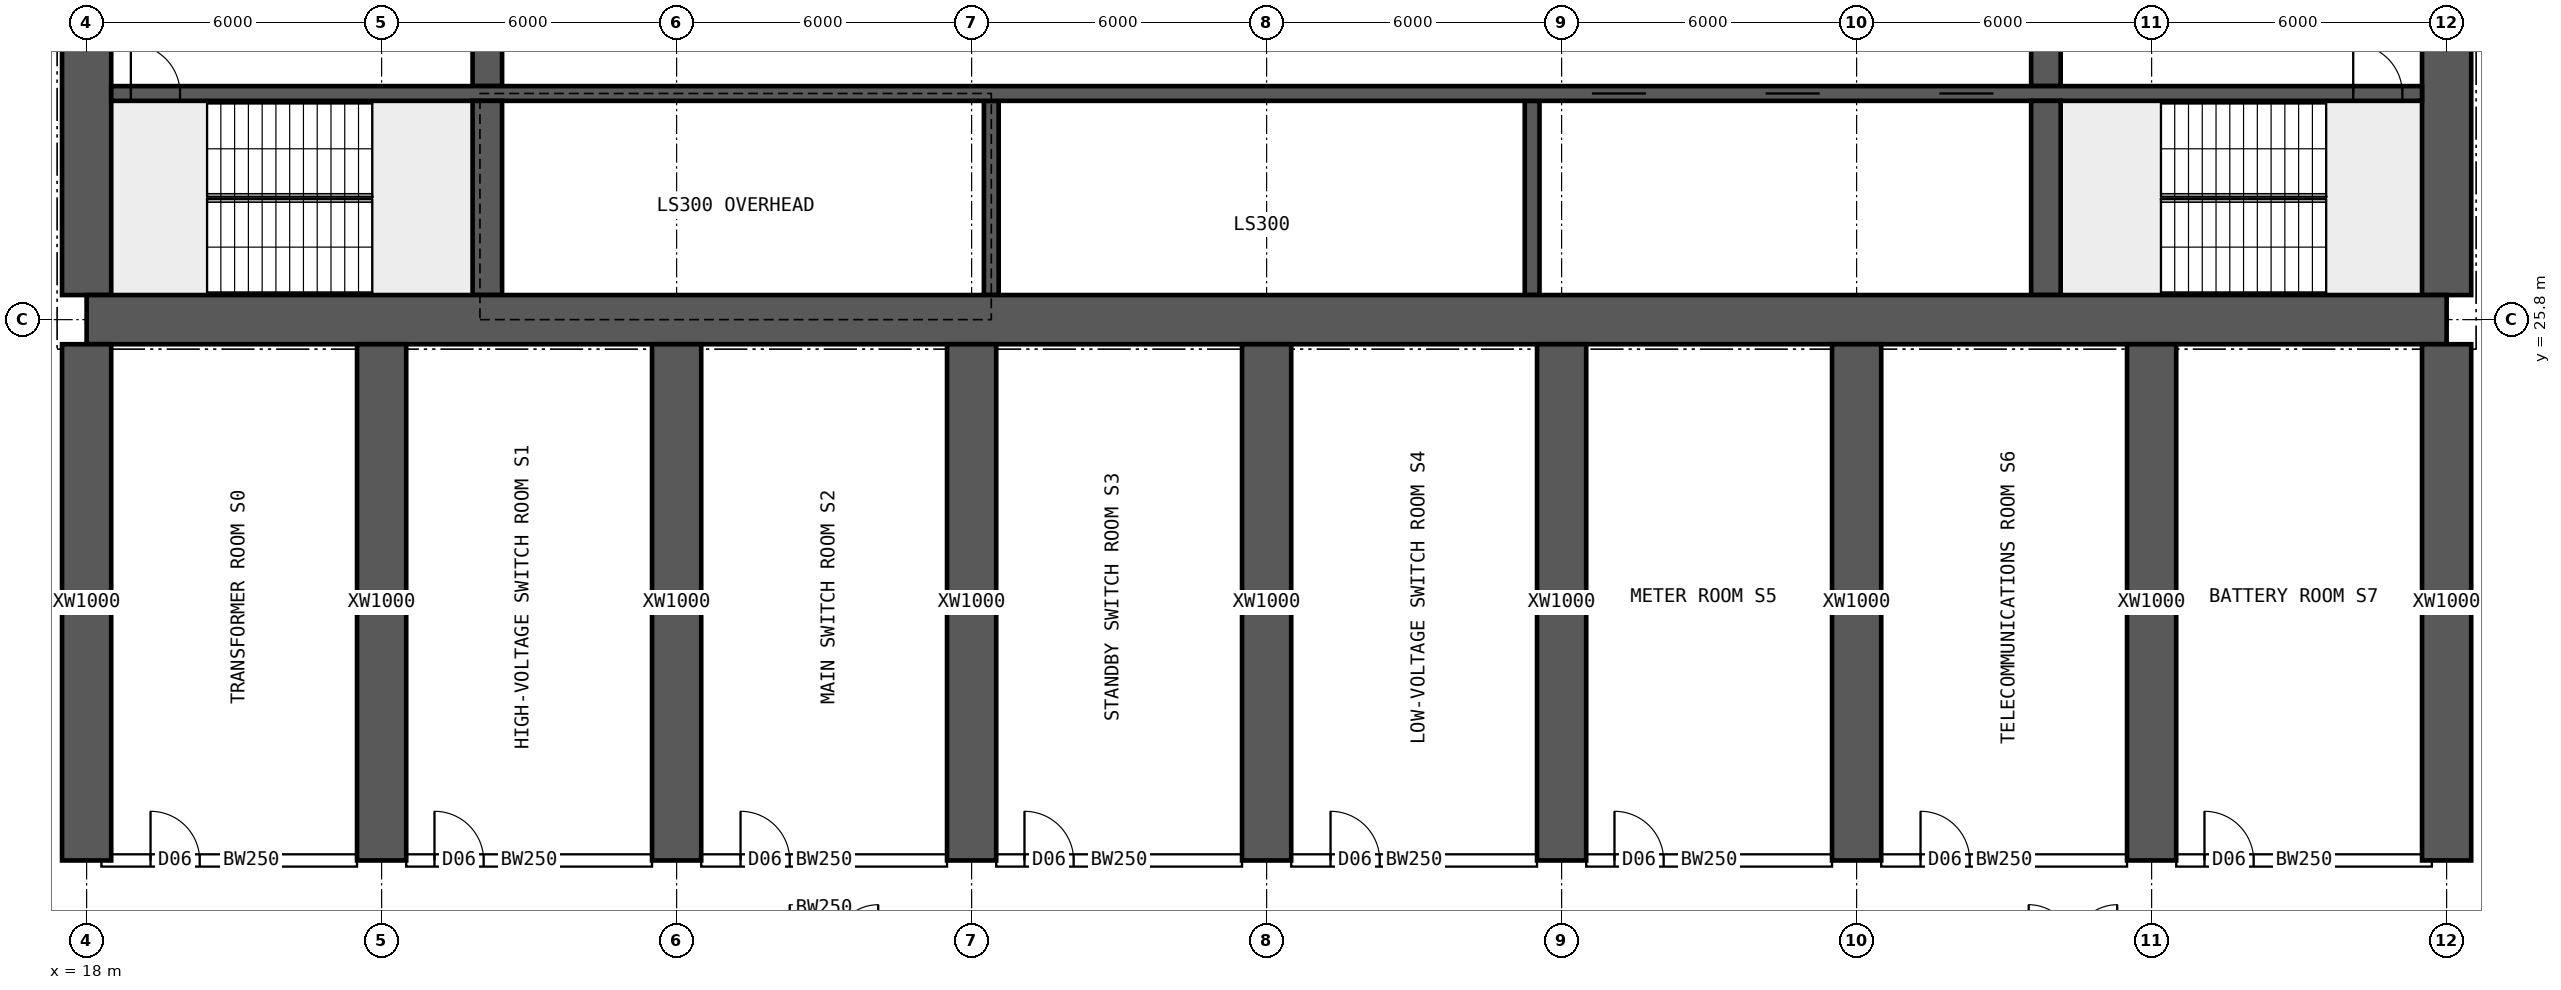
"""IFC4 building model, lengths in metres.
Left out: names, types, materials, properties, quantities, classifications, styles, units other than length and angle.
Written with IfcOpenShell. Run it as: python <this file> out.ifc"""

import sys

from ifc_helpers import new_model, si_unit, direction, frame, frame_2d, origin, place, context, subcontext, project, spatial, rectangle, extrude, element, fill, save


model = new_model("IFC4")
c1 = context("Model", 3, precision=1e-05, world=origin(), true_north=direction((0.0, 1.0)))
c2 = subcontext(c1, "Body", "Model", "MODEL_VIEW")
j1 = project(units=[si_unit("LENGTHUNIT", "METRE"), si_unit("PLANEANGLEUNIT", "RADIAN")], contexts=[c1])
p1 = place(None, origin())
s1 = spatial("IfcSite", under=j1, at=p1, CompositionType="ELEMENT")
p2 = place(p1, origin())
s2 = spatial("IfcBuilding", under=s1, at=p2, CompositionType="ELEMENT")
p3 = place(p2, frame((0.0, 0.0, -4.5)))
s3 = spatial("IfcBuildingStorey", under=s2, at=p3, CompositionType="ELEMENT", Elevation=-4.5)
p4 = place(p3, frame((18.0, 25.8, 0.0), z_axis=(0.0, 0.0, 1.0), x_axis=(1.0, 0.0, 0.0)))
e1 = element("IfcWall", 1, at=p4, inside=s3, PredefinedType="SHEAR", context=c2, shape_type="SweptSolid", body=[
    extrude(rectangle(XDim=48.0, YDim=1.0, at=frame_2d((24.0, 0.0))), origin(), (0.0, 0.0, 1.0), 4.5),
])
p5 = place(p3, frame((18.0, 26.3, 0.0), z_axis=(0.0, 0.0, 1.0), x_axis=(0.0, 1.0, 0.0)))
e2 = element("IfcWall", 2, at=p5, inside=s3, PredefinedType="SHEAR", context=c2, shape_type="SweptSolid", body=[
    extrude(rectangle(XDim=11.4, YDim=1.0, at=frame_2d((5.7, 0.0))), origin(), (0.0, 0.0, 1.0), 4.5),
])
p6 = place(p5, frame((5.0, 0.0, 0.0)))
e3 = element("IfcOpeningElement", 3, at=p6, cuts=e2, PredefinedType="OPENING", context=c2, shape_type="SweptSolid", body=[
    extrude(rectangle(XDim=1.2, YDim=2.1, at=frame_2d((0.6, 1.05))), frame((0.0, 0.51, 0.0), z_axis=(0.0, -1.0, 0.0), x_axis=(1.0, 0.0, 0.0)), (0.0, 0.0, 1.0), 1.02),
])
p7 = place(p3, frame((66.0, 26.3, 0.0), z_axis=(0.0, 0.0, 1.0), x_axis=(0.0, 1.0, 0.0)))
e4 = element("IfcWall", 4, at=p7, inside=s3, PredefinedType="SHEAR", context=c2, shape_type="SweptSolid", body=[
    extrude(rectangle(XDim=11.4, YDim=1.0, at=frame_2d((5.7, 0.0))), origin(), (0.0, 0.0, 1.0), 4.5),
])
p8 = place(p7, frame((5.0, 0.0, 0.0)))
e5 = element("IfcOpeningElement", 5, at=p8, cuts=e4, PredefinedType="OPENING", context=c2, shape_type="SweptSolid", body=[
    extrude(rectangle(XDim=1.2, YDim=2.1, at=frame_2d((0.6, 1.05))), frame((0.0, 0.51, 0.0), z_axis=(0.0, -1.0, 0.0), x_axis=(1.0, 0.0, 0.0)), (0.0, 0.0, 1.0), 1.02),
])
p9 = place(p3, frame((18.5, 30.4, 0.0), z_axis=(0.0, 0.0, 1.0), x_axis=(1.0, 0.0, 0.0)))
e6 = element("IfcWall", 6, at=p9, inside=s3, PredefinedType="SHEAR", context=c2, shape_type="SweptSolid", body=[
    extrude(rectangle(XDim=47.0, YDim=0.3, at=frame_2d((23.5, 0.0))), origin(), (0.0, 0.0, 1.0), 4.5),
])
p10 = place(p9, frame((0.4, 0.0, 0.0)))
e7 = element("IfcOpeningElement", 7, at=p10, cuts=e6, PredefinedType="OPENING", context=c2, shape_type="SweptSolid", body=[
    extrude(rectangle(XDim=1.0, YDim=2.1, at=frame_2d((0.5, 1.05))), frame((0.0, 0.16, 0.0), z_axis=(0.0, -1.0, 0.0), x_axis=(1.0, 0.0, 0.0)), (0.0, 0.0, 1.0), 0.32),
])
p11 = place(p9, frame((45.6, 0.0, 0.0)))
e8 = element("IfcOpeningElement", 8, at=p11, cuts=e6, PredefinedType="OPENING", context=c2, shape_type="SweptSolid", body=[
    extrude(rectangle(XDim=1.0, YDim=2.1, at=frame_2d((0.5, 1.05))), frame((0.0, 0.16, 0.0), z_axis=(0.0, -1.0, 0.0), x_axis=(1.0, 0.0, 0.0)), (0.0, 0.0, 1.0), 0.32),
])
p12 = place(p9, frame((30.117, 0.0, 0.0)))
e9 = element("IfcOpeningElement", 9, at=p12, cuts=e6, PredefinedType="OPENING", context=c2, shape_type="SweptSolid", body=[
    extrude(rectangle(XDim=1.1, YDim=2.1, at=frame_2d((0.55, 1.05))), frame((0.0, 0.16, 0.0), z_axis=(0.0, -1.0, 0.0), x_axis=(1.0, 0.0, 0.0)), (0.0, 0.0, 1.0), 0.32),
])
p13 = place(p9, frame((33.65, 0.0, 0.0)))
e10 = element("IfcOpeningElement", 10, at=p13, cuts=e6, PredefinedType="OPENING", context=c2, shape_type="SweptSolid", body=[
    extrude(rectangle(XDim=1.1, YDim=2.1, at=frame_2d((0.55, 1.05))), frame((0.0, 0.16, 0.0), z_axis=(0.0, -1.0, 0.0), x_axis=(1.0, 0.0, 0.0)), (0.0, 0.0, 1.0), 0.32),
])
p14 = place(p9, frame((37.183, 0.0, 0.0)))
e11 = element("IfcOpeningElement", 11, at=p14, cuts=e6, PredefinedType="OPENING", context=c2, shape_type="SweptSolid", body=[
    extrude(rectangle(XDim=1.1, YDim=2.1, at=frame_2d((0.55, 1.05))), frame((0.0, 0.16, 0.0), z_axis=(0.0, -1.0, 0.0), x_axis=(1.0, 0.0, 0.0)), (0.0, 0.0, 1.0), 0.32),
])
for number, where, z_axis, x_axis in (
    (12, (26.15, 26.3, 0.0), (0.0, 0.0, 1.0), (0.0, 1.0, 0.0)),
    (13, (57.85, 26.3, 0.0), (0.0, 0.0, 1.0), (0.0, 1.0, 0.0)),
):
    element("IfcWall", number, at=place(p3, frame(where, z_axis=z_axis, x_axis=x_axis)), inside=s3, PredefinedType="SHEAR", context=c2, shape_type="SweptSolid", body=[
        extrude(rectangle(XDim=3.95, YDim=0.6, at=frame_2d((1.975, 0.0))), origin(), (0.0, 0.0, 1.0), 4.5),
    ])
p15 = place(p3, frame((26.15, 30.55, 0.0), z_axis=(0.0, 0.0, 1.0), x_axis=(0.0, 1.0, 0.0)))
e14 = element("IfcWall", 14, at=p15, inside=s3, PredefinedType="SHEAR", context=c2, shape_type="SweptSolid", body=[
    extrude(rectangle(XDim=3.9, YDim=0.6, at=frame_2d((1.95, 0.0))), origin(), (0.0, 0.0, 1.0), 4.5),
])
p16 = place(p15, frame((1.4, 0.0, 0.0)))
e15 = element("IfcOpeningElement", 15, at=p16, cuts=e14, PredefinedType="OPENING", context=c2, shape_type="SweptSolid", body=[
    extrude(rectangle(XDim=1.2, YDim=2.1, at=frame_2d((0.6, 1.05))), frame((0.0, 0.31, 0.0), z_axis=(0.0, -1.0, 0.0), x_axis=(1.0, 0.0, 0.0)), (0.0, 0.0, 1.0), 0.62),
])
p17 = place(p3, frame((57.85, 30.55, 0.0), z_axis=(0.0, 0.0, 1.0), x_axis=(0.0, 1.0, 0.0)))
e16 = element("IfcWall", 16, at=p17, inside=s3, PredefinedType="SHEAR", context=c2, shape_type="SweptSolid", body=[
    extrude(rectangle(XDim=3.9, YDim=0.6, at=frame_2d((1.95, 0.0))), origin(), (0.0, 0.0, 1.0), 4.5),
])
p18 = place(p17, frame((1.4, 0.0, 0.0)))
e17 = element("IfcOpeningElement", 17, at=p18, cuts=e16, PredefinedType="OPENING", context=c2, shape_type="SweptSolid", body=[
    extrude(rectangle(XDim=1.2, YDim=2.1, at=frame_2d((0.6, 1.05))), frame((0.0, 0.31, 0.0), z_axis=(0.0, -1.0, 0.0), x_axis=(1.0, 0.0, 0.0)), (0.0, 0.0, 1.0), 0.62),
])
for number, where, z_axis, x_axis in (
    (18, (36.4, 26.3, 0.0), (0.0, 0.0, 1.0), (0.0, 1.0, 0.0)),
    (19, (47.4, 26.3, 0.0), (0.0, 0.0, 1.0), (0.0, 1.0, 0.0)),
):
    element("IfcWall", number, at=place(p3, frame(where, z_axis=z_axis, x_axis=x_axis)), inside=s3, PredefinedType="SHEAR", context=c2, shape_type="SweptSolid", body=[
        extrude(rectangle(XDim=3.95, YDim=0.3, at=frame_2d((1.975, 0.0))), origin(), (0.0, 0.0, 1.0), 4.5),
    ])
for number, where, z_axis, x_axis in (
    (20, (18.0, 14.8, 0.0), (0.0, 0.0, 1.0), (0.0, 1.0, 0.0)),
    (21, (24.0, 14.8, 0.0), (0.0, 0.0, 1.0), (0.0, 1.0, 0.0)),
    (22, (30.0, 14.8, 0.0), (0.0, 0.0, 1.0), (0.0, 1.0, 0.0)),
    (23, (36.0, 14.8, 0.0), (0.0, 0.0, 1.0), (0.0, 1.0, 0.0)),
    (24, (42.0, 14.8, 0.0), (0.0, 0.0, 1.0), (0.0, 1.0, 0.0)),
    (25, (48.0, 14.8, 0.0), (0.0, 0.0, 1.0), (0.0, 1.0, 0.0)),
    (26, (54.0, 14.8, 0.0), (0.0, 0.0, 1.0), (0.0, 1.0, 0.0)),
    (27, (60.0, 14.8, 0.0), (0.0, 0.0, 1.0), (0.0, 1.0, 0.0)),
    (28, (66.0, 14.8, 0.0), (0.0, 0.0, 1.0), (0.0, 1.0, 0.0)),
):
    element("IfcWall", number, at=place(p3, frame(where, z_axis=z_axis, x_axis=x_axis)), inside=s3, PredefinedType="SHEAR", context=c2, shape_type="SweptSolid", body=[
        extrude(rectangle(XDim=10.5, YDim=1.0, at=frame_2d((5.25, 0.0))), origin(), (0.0, 0.0, 1.0), 4.5),
    ])
p19 = place(p3, frame((18.3, 14.8, 0.0), z_axis=(0.0, 0.0, 1.0), x_axis=(1.0, 0.0, 0.0)))
e29 = element("IfcWall", 29, at=p19, inside=s3, PredefinedType="SOLIDWALL", context=c2, shape_type="SweptSolid", body=[
    extrude(rectangle(XDim=5.2, YDim=0.25, at=frame_2d((2.6, 0.0))), origin(), (0.0, 0.0, 1.0), 4.15),
])
p20 = place(p19, frame((1.0, 0.0, 0.0)))
e30 = element("IfcOpeningElement", 30, at=p20, cuts=e29, PredefinedType="OPENING", context=c2, shape_type="SweptSolid", body=[
    extrude(rectangle(XDim=1.0, YDim=2.1, at=frame_2d((0.5, 1.05))), frame((0.0, 0.135, 0.0), z_axis=(0.0, -1.0, 0.0), x_axis=(1.0, 0.0, 0.0)), (0.0, 0.0, 1.0), 0.27),
])
p21 = place(p3, frame((24.5, 14.8, 0.0), z_axis=(0.0, 0.0, 1.0), x_axis=(1.0, 0.0, 0.0)))
e31 = element("IfcWall", 31, at=p21, inside=s3, PredefinedType="SOLIDWALL", context=c2, shape_type="SweptSolid", body=[
    extrude(rectangle(XDim=5.0, YDim=0.25, at=frame_2d((2.5, 0.0))), origin(), (0.0, 0.0, 1.0), 4.15),
])
p22 = place(p21, frame((0.575, 0.0, 0.0)))
e32 = element("IfcOpeningElement", 32, at=p22, cuts=e31, PredefinedType="OPENING", context=c2, shape_type="SweptSolid", body=[
    extrude(rectangle(XDim=1.0, YDim=2.1, at=frame_2d((0.5, 1.05))), frame((0.0, 0.135, 0.0), z_axis=(0.0, -1.0, 0.0), x_axis=(1.0, 0.0, 0.0)), (0.0, 0.0, 1.0), 0.27),
])
p23 = place(p3, frame((30.5, 14.8, 0.0), z_axis=(0.0, 0.0, 1.0), x_axis=(1.0, 0.0, 0.0)))
e33 = element("IfcWall", 33, at=p23, inside=s3, PredefinedType="SOLIDWALL", context=c2, shape_type="SweptSolid", body=[
    extrude(rectangle(XDim=5.0, YDim=0.25, at=frame_2d((2.5, 0.0))), origin(), (0.0, 0.0, 1.0), 4.15),
])
p24 = place(p23, frame((0.8, 0.0, 0.0)))
e34 = element("IfcOpeningElement", 34, at=p24, cuts=e33, PredefinedType="OPENING", context=c2, shape_type="SweptSolid", body=[
    extrude(rectangle(XDim=1.0, YDim=2.1, at=frame_2d((0.5, 1.05))), frame((0.0, 0.135, 0.0), z_axis=(0.0, -1.0, 0.0), x_axis=(1.0, 0.0, 0.0)), (0.0, 0.0, 1.0), 0.27),
])
p25 = place(p3, frame((36.5, 14.8, 0.0), z_axis=(0.0, 0.0, 1.0), x_axis=(1.0, 0.0, 0.0)))
e35 = element("IfcWall", 35, at=p25, inside=s3, PredefinedType="SOLIDWALL", context=c2, shape_type="SweptSolid", body=[
    extrude(rectangle(XDim=5.0, YDim=0.25, at=frame_2d((2.5, 0.0))), origin(), (0.0, 0.0, 1.0), 4.15),
])
p26 = place(p25, frame((0.575, 0.0, 0.0)))
e36 = element("IfcOpeningElement", 36, at=p26, cuts=e35, PredefinedType="OPENING", context=c2, shape_type="SweptSolid", body=[
    extrude(rectangle(XDim=1.0, YDim=2.1, at=frame_2d((0.5, 1.05))), frame((0.0, 0.135, 0.0), z_axis=(0.0, -1.0, 0.0), x_axis=(1.0, 0.0, 0.0)), (0.0, 0.0, 1.0), 0.27),
])
p27 = place(p3, frame((42.5, 14.8, 0.0), z_axis=(0.0, 0.0, 1.0), x_axis=(1.0, 0.0, 0.0)))
e37 = element("IfcWall", 37, at=p27, inside=s3, PredefinedType="SOLIDWALL", context=c2, shape_type="SweptSolid", body=[
    extrude(rectangle(XDim=5.0, YDim=0.25, at=frame_2d((2.5, 0.0))), origin(), (0.0, 0.0, 1.0), 4.15),
])
p28 = place(p27, frame((0.8, 0.0, 0.0)))
e38 = element("IfcOpeningElement", 38, at=p28, cuts=e37, PredefinedType="OPENING", context=c2, shape_type="SweptSolid", body=[
    extrude(rectangle(XDim=1.0, YDim=2.1, at=frame_2d((0.5, 1.05))), frame((0.0, 0.135, 0.0), z_axis=(0.0, -1.0, 0.0), x_axis=(1.0, 0.0, 0.0)), (0.0, 0.0, 1.0), 0.27),
])
p29 = place(p3, frame((48.5, 14.8, 0.0), z_axis=(0.0, 0.0, 1.0), x_axis=(1.0, 0.0, 0.0)))
e39 = element("IfcWall", 39, at=p29, inside=s3, PredefinedType="SOLIDWALL", context=c2, shape_type="SweptSolid", body=[
    extrude(rectangle(XDim=5.0, YDim=0.25, at=frame_2d((2.5, 0.0))), origin(), (0.0, 0.0, 1.0), 4.15),
])
p30 = place(p29, frame((0.575, 0.0, 0.0)))
e40 = element("IfcOpeningElement", 40, at=p30, cuts=e39, PredefinedType="OPENING", context=c2, shape_type="SweptSolid", body=[
    extrude(rectangle(XDim=1.0, YDim=2.1, at=frame_2d((0.5, 1.05))), frame((0.0, 0.135, 0.0), z_axis=(0.0, -1.0, 0.0), x_axis=(1.0, 0.0, 0.0)), (0.0, 0.0, 1.0), 0.27),
])
p31 = place(p3, frame((54.5, 14.8, 0.0), z_axis=(0.0, 0.0, 1.0), x_axis=(1.0, 0.0, 0.0)))
e41 = element("IfcWall", 41, at=p31, inside=s3, PredefinedType="SOLIDWALL", context=c2, shape_type="SweptSolid", body=[
    extrude(rectangle(XDim=5.0, YDim=0.25, at=frame_2d((2.5, 0.0))), origin(), (0.0, 0.0, 1.0), 4.15),
])
p32 = place(p31, frame((0.8, 0.0, 0.0)))
e42 = element("IfcOpeningElement", 42, at=p32, cuts=e41, PredefinedType="OPENING", context=c2, shape_type="SweptSolid", body=[
    extrude(rectangle(XDim=1.0, YDim=2.1, at=frame_2d((0.5, 1.05))), frame((0.0, 0.135, 0.0), z_axis=(0.0, -1.0, 0.0), x_axis=(1.0, 0.0, 0.0)), (0.0, 0.0, 1.0), 0.27),
])
p33 = place(p3, frame((60.5, 14.8, 0.0), z_axis=(0.0, 0.0, 1.0), x_axis=(1.0, 0.0, 0.0)))
e43 = element("IfcWall", 43, at=p33, inside=s3, PredefinedType="SOLIDWALL", context=c2, shape_type="SweptSolid", body=[
    extrude(rectangle(XDim=5.2, YDim=0.25, at=frame_2d((2.6, 0.0))), origin(), (0.0, 0.0, 1.0), 4.15),
])
p34 = place(p33, frame((0.575, 0.0, 0.0)))
e44 = element("IfcOpeningElement", 44, at=p34, cuts=e43, PredefinedType="OPENING", context=c2, shape_type="SweptSolid", body=[
    extrude(rectangle(XDim=1.0, YDim=2.1, at=frame_2d((0.5, 1.05))), frame((0.0, 0.135, 0.0), z_axis=(0.0, -1.0, 0.0), x_axis=(1.0, 0.0, 0.0)), (0.0, 0.0, 1.0), 0.27),
])
p35 = place(p10, origin())
e45 = element("IfcDoor", 45, at=p35, inside=s3, OperationType="SINGLE_SWING_LEFT", PredefinedType="DOOR", context=c2, shape_type="SweptSolid", body=[
    extrude(rectangle(XDim=1.0, YDim=2.1, at=frame_2d((0.5, 1.05))), frame((0.0, 0.025, 0.0), z_axis=(0.0, -1.0, 0.0), x_axis=(1.0, 0.0, 0.0)), (0.0, 0.0, 1.0), 0.05),
])
fill(e7, e45)
p36 = place(p11, origin())
e46 = element("IfcDoor", 46, at=p36, inside=s3, OperationType="SINGLE_SWING_LEFT", PredefinedType="DOOR", context=c2, shape_type="SweptSolid", body=[
    extrude(rectangle(XDim=1.0, YDim=2.1, at=frame_2d((0.5, 1.05))), frame((0.0, 0.025, 0.0), z_axis=(0.0, -1.0, 0.0), x_axis=(1.0, 0.0, 0.0)), (0.0, 0.0, 1.0), 0.05),
])
fill(e8, e46)
p37 = place(p12, origin())
e47 = element("IfcDoor", 47, at=p37, inside=s3, OperationType="DOUBLE_DOOR_SLIDING", PredefinedType="DOOR", context=c2, shape_type="SweptSolid", body=[
    extrude(rectangle(XDim=1.1, YDim=2.1, at=frame_2d((0.55, 1.05))), frame((0.0, 0.025, 0.0), z_axis=(0.0, -1.0, 0.0), x_axis=(1.0, 0.0, 0.0)), (0.0, 0.0, 1.0), 0.05),
])
fill(e9, e47)
p38 = place(p13, origin())
e48 = element("IfcDoor", 48, at=p38, inside=s3, OperationType="DOUBLE_DOOR_SLIDING", PredefinedType="DOOR", context=c2, shape_type="SweptSolid", body=[
    extrude(rectangle(XDim=1.1, YDim=2.1, at=frame_2d((0.55, 1.05))), frame((0.0, 0.025, 0.0), z_axis=(0.0, -1.0, 0.0), x_axis=(1.0, 0.0, 0.0)), (0.0, 0.0, 1.0), 0.05),
])
fill(e10, e48)
p39 = place(p14, origin())
e49 = element("IfcDoor", 49, at=p39, inside=s3, OperationType="DOUBLE_DOOR_SLIDING", PredefinedType="DOOR", context=c2, shape_type="SweptSolid", body=[
    extrude(rectangle(XDim=1.1, YDim=2.1, at=frame_2d((0.55, 1.05))), frame((0.0, 0.025, 0.0), z_axis=(0.0, -1.0, 0.0), x_axis=(1.0, 0.0, 0.0)), (0.0, 0.0, 1.0), 0.05),
])
fill(e11, e49)
p40 = place(p20, origin())
e50 = element("IfcDoor", 50, at=p40, inside=s3, OperationType="SINGLE_SWING_LEFT", PredefinedType="DOOR", context=c2, shape_type="SweptSolid", body=[
    extrude(rectangle(XDim=1.0, YDim=2.1, at=frame_2d((0.5, 1.05))), frame((0.0, 0.025, 0.0), z_axis=(0.0, -1.0, 0.0), x_axis=(1.0, 0.0, 0.0)), (0.0, 0.0, 1.0), 0.05),
])
fill(e30, e50)
p41 = place(p22, origin())
e51 = element("IfcDoor", 51, at=p41, inside=s3, OperationType="SINGLE_SWING_LEFT", PredefinedType="DOOR", context=c2, shape_type="SweptSolid", body=[
    extrude(rectangle(XDim=1.0, YDim=2.1, at=frame_2d((0.5, 1.05))), frame((0.0, 0.025, 0.0), z_axis=(0.0, -1.0, 0.0), x_axis=(1.0, 0.0, 0.0)), (0.0, 0.0, 1.0), 0.05),
])
fill(e32, e51)
p42 = place(p24, origin())
e52 = element("IfcDoor", 52, at=p42, inside=s3, OperationType="SINGLE_SWING_LEFT", PredefinedType="DOOR", context=c2, shape_type="SweptSolid", body=[
    extrude(rectangle(XDim=1.0, YDim=2.1, at=frame_2d((0.5, 1.05))), frame((0.0, 0.025, 0.0), z_axis=(0.0, -1.0, 0.0), x_axis=(1.0, 0.0, 0.0)), (0.0, 0.0, 1.0), 0.05),
])
fill(e34, e52)
p43 = place(p26, origin())
e53 = element("IfcDoor", 53, at=p43, inside=s3, OperationType="SINGLE_SWING_LEFT", PredefinedType="DOOR", context=c2, shape_type="SweptSolid", body=[
    extrude(rectangle(XDim=1.0, YDim=2.1, at=frame_2d((0.5, 1.05))), frame((0.0, 0.025, 0.0), z_axis=(0.0, -1.0, 0.0), x_axis=(1.0, 0.0, 0.0)), (0.0, 0.0, 1.0), 0.05),
])
fill(e36, e53)
p44 = place(p28, origin())
e54 = element("IfcDoor", 54, at=p44, inside=s3, OperationType="SINGLE_SWING_LEFT", PredefinedType="DOOR", context=c2, shape_type="SweptSolid", body=[
    extrude(rectangle(XDim=1.0, YDim=2.1, at=frame_2d((0.5, 1.05))), frame((0.0, 0.025, 0.0), z_axis=(0.0, -1.0, 0.0), x_axis=(1.0, 0.0, 0.0)), (0.0, 0.0, 1.0), 0.05),
])
fill(e38, e54)
p45 = place(p30, origin())
e55 = element("IfcDoor", 55, at=p45, inside=s3, OperationType="SINGLE_SWING_LEFT", PredefinedType="DOOR", context=c2, shape_type="SweptSolid", body=[
    extrude(rectangle(XDim=1.0, YDim=2.1, at=frame_2d((0.5, 1.05))), frame((0.0, 0.025, 0.0), z_axis=(0.0, -1.0, 0.0), x_axis=(1.0, 0.0, 0.0)), (0.0, 0.0, 1.0), 0.05),
])
fill(e40, e55)
p46 = place(p32, origin())
e56 = element("IfcDoor", 56, at=p46, inside=s3, OperationType="SINGLE_SWING_LEFT", PredefinedType="DOOR", context=c2, shape_type="SweptSolid", body=[
    extrude(rectangle(XDim=1.0, YDim=2.1, at=frame_2d((0.5, 1.05))), frame((0.0, 0.025, 0.0), z_axis=(0.0, -1.0, 0.0), x_axis=(1.0, 0.0, 0.0)), (0.0, 0.0, 1.0), 0.05),
])
fill(e42, e56)
p47 = place(p34, origin())
e57 = element("IfcDoor", 57, at=p47, inside=s3, OperationType="SINGLE_SWING_LEFT", PredefinedType="DOOR", context=c2, shape_type="SweptSolid", body=[
    extrude(rectangle(XDim=1.0, YDim=2.1, at=frame_2d((0.5, 1.05))), frame((0.0, 0.025, 0.0), z_axis=(0.0, -1.0, 0.0), x_axis=(1.0, 0.0, 0.0)), (0.0, 0.0, 1.0), 0.05),
])
fill(e44, e57)
save(model, sys.argv[1])
